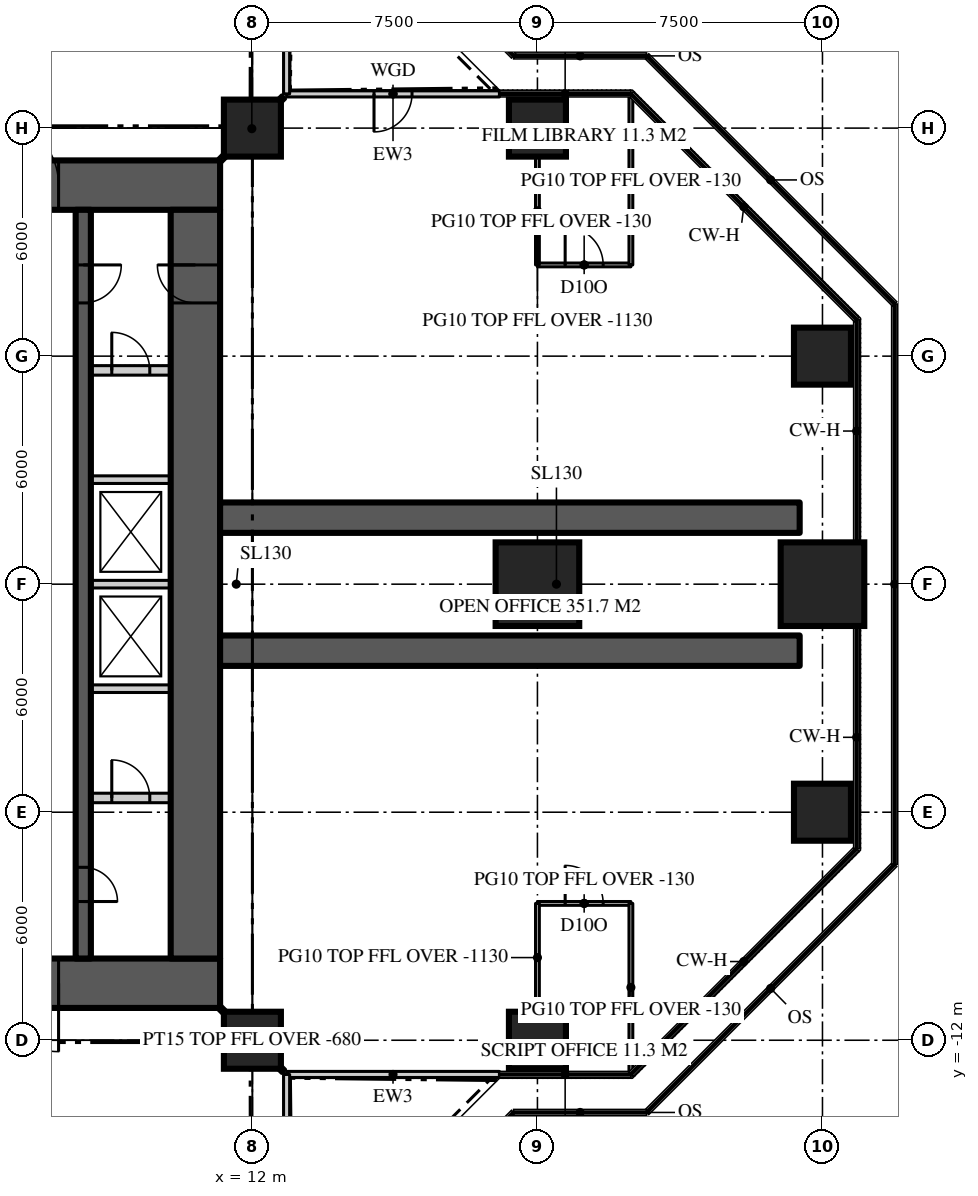
"""IFC4 building model, lengths in metres.
Left out: names, types, materials, properties, quantities, classifications, styles, units other than length and angle.
Written with IfcOpenShell. Run it as: python <this file> out.ifc"""

import sys

from ifc_helpers import new_model, si_unit, direction, frame, frame_2d, origin, origin_2d, place, context, subcontext, project, spatial, rectangle, extrude, element, fill, save


model = new_model("IFC4")
c1 = context("Model", 3, precision=1e-05, world=origin(), true_north=direction((0.0, 1.0)))
c2 = subcontext(c1, "Body", "Model", "MODEL_VIEW")
j1 = project(units=[si_unit("LENGTHUNIT", "METRE"), si_unit("PLANEANGLEUNIT", "RADIAN")], contexts=[c1])
p1 = place(None, origin())
s1 = spatial("IfcSite", under=j1, at=p1, CompositionType="ELEMENT")
p2 = place(p1, origin())
s2 = spatial("IfcBuilding", under=s1, at=p2, CompositionType="ELEMENT")
p3 = place(p2, frame((0.0, 0.0, 255.6)))
s3 = spatial("IfcBuildingStorey", under=s2, at=p3, CompositionType="ELEMENT", Elevation=255.6)
p4 = place(p3, frame((-11.15, 10.5, 0.0), z_axis=(0.0, 0.0, 1.0), x_axis=(1.0, 0.0, 0.0)))
e1 = element("IfcWall", 1, at=p4, inside=s3, PredefinedType="SHEAR", context=c2, shape_type="SweptSolid", body=[
    extrude(rectangle(XDim=22.3, YDim=1.3, at=frame_2d((11.15, 0.0))), origin(), (0.0, 0.0, 1.0), 3.9),
])
p5 = place(p4, frame((4.25, 0.0, 0.0)))
e2 = element("IfcOpeningElement", 2, at=p5, cuts=e1, PredefinedType="OPENING", context=c2, shape_type="SweptSolid", body=[
    extrude(rectangle(XDim=1.8, YDim=2.2, at=frame_2d((0.9, 1.1))), frame((0.0, 0.66, 0.0), z_axis=(0.0, -1.0, 0.0), x_axis=(1.0, 0.0, 0.0)), (0.0, 0.0, 1.0), 1.32),
])
p6 = place(p4, frame((16.25, 0.0, 0.0)))
e3 = element("IfcOpeningElement", 3, at=p6, cuts=e1, PredefinedType="OPENING", context=c2, shape_type="SweptSolid", body=[
    extrude(rectangle(XDim=1.8, YDim=2.2, at=frame_2d((0.9, 1.1))), frame((0.0, 0.66, 0.0), z_axis=(0.0, -1.0, 0.0), x_axis=(1.0, 0.0, 0.0)), (0.0, 0.0, 1.0), 1.32),
])
p7 = place(p3, frame((11.15, -10.5, 0.0), z_axis=(0.0, 0.0, 1.0), x_axis=(-1.0, 0.0, 0.0)))
e4 = element("IfcWall", 4, at=p7, inside=s3, PredefinedType="SHEAR", context=c2, shape_type="SweptSolid", body=[
    extrude(rectangle(XDim=22.3, YDim=1.3, at=frame_2d((11.15, 0.0))), origin(), (0.0, 0.0, 1.0), 3.9),
])
p8 = place(p7, frame((16.25, 0.0, 0.0)))
e5 = element("IfcOpeningElement", 5, at=p8, cuts=e4, PredefinedType="OPENING", context=c2, shape_type="SweptSolid", body=[
    extrude(rectangle(XDim=1.8, YDim=2.2, at=frame_2d((0.9, 1.1))), frame((0.0, 0.66, 0.0), z_axis=(0.0, -1.0, 0.0), x_axis=(1.0, 0.0, 0.0)), (0.0, 0.0, 1.0), 1.32),
])
p9 = place(p7, frame((4.25, 0.0, 0.0)))
e6 = element("IfcOpeningElement", 6, at=p9, cuts=e4, PredefinedType="OPENING", context=c2, shape_type="SweptSolid", body=[
    extrude(rectangle(XDim=1.8, YDim=2.2, at=frame_2d((0.9, 1.1))), frame((0.0, 0.66, 0.0), z_axis=(0.0, -1.0, 0.0), x_axis=(1.0, 0.0, 0.0)), (0.0, 0.0, 1.0), 1.32),
])
p10 = place(p3, frame((10.5, -9.85, 0.0), z_axis=(0.0, 0.0, 1.0), x_axis=(0.0, 1.0, 0.0)))
e7 = element("IfcWall", 7, at=p10, inside=s3, PredefinedType="SHEAR", context=c2, shape_type="SweptSolid", body=[
    extrude(rectangle(XDim=19.7, YDim=1.3, at=frame_2d((9.85, 0.0))), origin(), (0.0, 0.0, 1.0), 3.9),
])
p11 = place(p10, frame((17.25, 0.0, 0.0)))
e8 = element("IfcOpeningElement", 8, at=p11, cuts=e7, PredefinedType="OPENING", context=c2, shape_type="SweptSolid", body=[
    extrude(rectangle(XDim=1.0, YDim=2.2, at=frame_2d((0.5, 1.1))), frame((0.0, 0.66, 0.0), z_axis=(0.0, -1.0, 0.0), x_axis=(1.0, 0.0, 0.0)), (0.0, 0.0, 1.0), 1.32),
])
for number, where, z_axis, x_axis in (
    (9, (11.15, -1.75, 0.0), (0.0, 0.0, 1.0), (1.0, 0.0, 0.0)),
    (10, (11.15, 1.75, 0.0), (0.0, 0.0, 1.0), (1.0, 0.0, 0.0)),
):
    element("IfcWall", number, at=place(p3, frame(where, z_axis=z_axis, x_axis=x_axis)), inside=s3, PredefinedType="SHEAR", context=c2, shape_type="SweptSolid", body=[
        extrude(rectangle(XDim=15.25, YDim=0.8, at=frame_2d((7.625, 0.0))), origin(), (0.0, 0.0, 1.0), 3.9),
    ])
for number, where, z_axis, x_axis in (
    (11, (12.0, -12.0, 0.0), (0.0, 0.0, 1.0), (1.0, 0.0, 0.0)),
    (12, (19.5, -12.0, 0.0), (0.0, 0.0, 1.0), (1.0, 0.0, 0.0)),
    (13, (27.0, -6.0, 0.0), (0.0, 0.0, 1.0), (1.0, 0.0, 0.0)),
):
    element("IfcColumn", number, at=place(p3, frame(where, z_axis=z_axis, x_axis=x_axis)), inside=s3, PredefinedType="COLUMN", context=c2, shape_type="SweptSolid", body=[
        extrude(rectangle(XDim=1.5, YDim=1.5, at=origin_2d()), origin(), (0.0, 0.0, 1.0), 3.9),
    ])
for number, where, z_axis, x_axis in (
    (14, (19.5, 0.0, 0.0), (0.0, 0.0, 1.0), (1.0, 0.0, 0.0)),
    (15, (27.0, 0.0, 0.0), (0.0, 0.0, 1.0), (1.0, 0.0, 0.0)),
):
    element("IfcColumn", number, at=place(p3, frame(where, z_axis=z_axis, x_axis=x_axis)), inside=s3, PredefinedType="COLUMN", context=c2, shape_type="SweptSolid", body=[
        extrude(rectangle(XDim=2.2, YDim=2.2, at=origin_2d()), origin(), (0.0, 0.0, 1.0), 3.9),
    ])
for number, where, z_axis, x_axis in (
    (16, (27.0, 6.0, 0.0), (0.0, 0.0, 1.0), (1.0, 0.0, 0.0)),
    (17, (12.0, 12.0, 0.0), (0.0, 0.0, 1.0), (1.0, 0.0, 0.0)),
    (18, (19.5, 12.0, 0.0), (0.0, 0.0, 1.0), (1.0, 0.0, 0.0)),
):
    element("IfcColumn", number, at=place(p3, frame(where, z_axis=z_axis, x_axis=x_axis)), inside=s3, PredefinedType="COLUMN", context=c2, shape_type="SweptSolid", body=[
        extrude(rectangle(XDim=1.5, YDim=1.5, at=origin_2d()), origin(), (0.0, 0.0, 1.0), 3.9),
    ])
p12 = place(p3, frame((12.9, -12.9, 0.0), z_axis=(0.0, 0.0, 1.0), x_axis=(1.0, 0.0, 0.0)))
e19 = element("IfcWall", 19, at=p12, inside=s3, PredefinedType="SOLIDWALL", context=c2, shape_type="SweptSolid", body=[
    extrude(rectangle(XDim=5.6, YDim=0.16, at=frame_2d((2.8, 0.0))), origin(), (0.0, 0.0, 1.0), 3.77),
])
p13 = place(p3, frame((18.5, 12.9, 0.0), z_axis=(0.0, 0.0, 1.0), x_axis=(-1.0, 0.0, 0.0)))
e20 = element("IfcWall", 20, at=p13, inside=s3, PredefinedType="SOLIDWALL", context=c2, shape_type="SweptSolid", body=[
    extrude(rectangle(XDim=5.6, YDim=0.16, at=frame_2d((2.8, 0.0))), origin(), (0.0, 0.0, 1.0), 3.77),
])
p14 = place(p13, frame((2.3, 0.0, 0.0)))
e21 = element("IfcOpeningElement", 21, at=p14, cuts=e20, PredefinedType="OPENING", context=c2, shape_type="SweptSolid", body=[
    extrude(rectangle(XDim=1.0, YDim=2.2, at=frame_2d((0.5, 1.1))), frame((0.0, 0.09, 0.0), z_axis=(0.0, -1.0, 0.0), x_axis=(1.0, 0.0, 0.0)), (0.0, 0.0, 1.0), 0.18),
])
p15 = place(p3, frame((12.9, 12.9, 0.0), z_axis=(0.0, 0.0, 1.0), x_axis=(0.0, 1.0, 0.0)))
e22 = element("IfcWall", 22, at=p15, inside=s3, PredefinedType="SOLIDWALL", context=c2, shape_type="SweptSolid", body=[
    extrude(rectangle(XDim=5.6, YDim=0.16, at=frame_2d((2.8, 0.0))), origin(), (0.0, 0.0, 1.0), 3.77),
])
p16 = place(p3, frame((12.9, -18.5, 0.0), z_axis=(0.0, 0.0, 1.0), x_axis=(0.0, 1.0, 0.0)))
e23 = element("IfcWall", 23, at=p16, inside=s3, PredefinedType="SOLIDWALL", context=c2, shape_type="SweptSolid", body=[
    extrude(rectangle(XDim=5.6, YDim=0.16, at=frame_2d((2.8, 0.0))), origin(), (0.0, 0.0, 1.0), 3.77),
])
p17 = place(p16, frame((2.3, 0.0, 0.0)))
e24 = element("IfcOpeningElement", 24, at=p17, cuts=e23, PredefinedType="OPENING", context=c2, shape_type="SweptSolid", body=[
    extrude(rectangle(XDim=1.0, YDim=2.2, at=frame_2d((0.5, 1.1))), frame((0.0, 0.09, 0.0), z_axis=(0.0, -1.0, 0.0), x_axis=(1.0, 0.0, 0.0)), (0.0, 0.0, 1.0), 0.18),
])
p18 = place(p3, frame((7.55, 9.85, 0.0), z_axis=(0.0, 0.0, 1.0), x_axis=(0.0, -1.0, 0.0)))
e25 = element("IfcWall", 25, at=p18, inside=s3, PredefinedType="SHEAR", context=c2, shape_type="SweptSolid", body=[
    extrude(rectangle(XDim=19.7, YDim=0.4, at=frame_2d((9.85, 0.0))), origin(), (0.0, 0.0, 1.0), 3.9),
])
p19 = place(p18, frame((1.45, 0.0, 0.0)))
e26 = element("IfcOpeningElement", 26, at=p19, cuts=e25, PredefinedType="OPENING", context=c2, shape_type="SweptSolid", body=[
    extrude(rectangle(XDim=1.0, YDim=2.2, at=frame_2d((0.5, 1.1))), frame((0.0, 0.21, 0.0), z_axis=(0.0, -1.0, 0.0), x_axis=(1.0, 0.0, 0.0)), (0.0, 0.0, 1.0), 0.42),
])
p20 = place(p18, frame((17.3, 0.0, 0.0)))
e27 = element("IfcOpeningElement", 27, at=p20, cuts=e25, PredefinedType="OPENING", context=c2, shape_type="SweptSolid", body=[
    extrude(rectangle(XDim=0.9, YDim=2.1, at=frame_2d((0.45, 1.05))), frame((0.0, 0.21, 0.0), z_axis=(0.0, -1.0, 0.0), x_axis=(1.0, 0.0, 0.0)), (0.0, 0.0, 1.0), 0.42),
])
p21 = place(p3, frame((7.75, 5.625, 0.0), z_axis=(0.0, 0.0, 1.0), x_axis=(1.0, 0.0, 0.0)))
e28 = element("IfcWall", 28, at=p21, inside=s3, PredefinedType="SOLIDWALL", context=c2, shape_type="SweptSolid", body=[
    extrude(rectangle(XDim=2.1, YDim=0.25, at=frame_2d((1.05, 0.0))), origin(), (0.0, 0.0, 1.0), 3.7),
])
p22 = place(p21, frame((0.55, 0.0, 0.0)))
e29 = element("IfcOpeningElement", 29, at=p22, cuts=e28, PredefinedType="OPENING", context=c2, shape_type="SweptSolid", body=[
    extrude(rectangle(XDim=1.0, YDim=2.2, at=frame_2d((0.5, 1.1))), frame((0.0, 0.135, 0.0), z_axis=(0.0, -1.0, 0.0), x_axis=(1.0, 0.0, 0.0)), (0.0, 0.0, 1.0), 0.27),
])
p23 = place(p3, frame((7.75, -5.625, 0.0), z_axis=(0.0, 0.0, 1.0), x_axis=(1.0, 0.0, 0.0)))
e30 = element("IfcWall", 30, at=p23, inside=s3, PredefinedType="SOLIDWALL", context=c2, shape_type="SweptSolid", body=[
    extrude(rectangle(XDim=2.1, YDim=0.25, at=frame_2d((1.05, 0.0))), origin(), (0.0, 0.0, 1.0), 3.7),
])
p24 = place(p23, frame((0.55, 0.0, 0.0)))
e31 = element("IfcOpeningElement", 31, at=p24, cuts=e30, PredefinedType="OPENING", context=c2, shape_type="SweptSolid", body=[
    extrude(rectangle(XDim=1.0, YDim=2.2, at=frame_2d((0.5, 1.1))), frame((0.0, 0.135, 0.0), z_axis=(0.0, -1.0, 0.0), x_axis=(1.0, 0.0, 0.0)), (0.0, 0.0, 1.0), 0.27),
])
for number, where, z_axis, x_axis in (
    (32, (7.75, -2.75, 0.0), (0.0, 0.0, 1.0), (1.0, 0.0, 0.0)),
    (33, (7.75, 0.0, 0.0), (0.0, 0.0, 1.0), (1.0, 0.0, 0.0)),
    (34, (7.75, 2.75, 0.0), (0.0, 0.0, 1.0), (1.0, 0.0, 0.0)),
):
    element("IfcWall", number, at=place(p3, frame(where, z_axis=z_axis, x_axis=x_axis)), inside=s3, PredefinedType="SOLIDWALL", context=c2, shape_type="SweptSolid", body=[
        extrude(rectangle(XDim=2.1, YDim=0.2, at=frame_2d((1.05, 0.0))), origin(), (0.0, 0.0, 1.0), 3.7),
    ])
p25 = place(p3, frame((19.5, 8.4, 0.0), z_axis=(0.0, 0.0, 1.0), x_axis=(1.0, 0.0, 0.0)))
e35 = element("IfcWall", 35, at=p25, inside=s3, PredefinedType="PARTITIONING", context=c2, shape_type="SweptSolid", body=[
    extrude(rectangle(XDim=2.459, YDim=0.1, at=frame_2d((1.229, 0.0))), origin(), (0.0, 0.0, 1.0), 3.77),
])
p26 = place(p25, frame((0.729, 0.0, 0.0)))
e36 = element("IfcOpeningElement", 36, at=p26, cuts=e35, PredefinedType="OPENING", context=c2, shape_type="SweptSolid", body=[
    extrude(rectangle(XDim=1.0, YDim=2.2, at=frame_2d((0.5, 1.1))), frame((0.0, 0.06, 0.0), z_axis=(0.0, -1.0, 0.0), x_axis=(1.0, 0.0, 0.0)), (0.0, 0.0, 1.0), 0.12),
])
p27 = place(p3, frame((19.5, 8.4, 0.0), z_axis=(0.0, 0.0, 1.0), x_axis=(0.0, 1.0, 0.0)))
e37 = element("IfcWall", 37, at=p27, inside=s3, PredefinedType="PARTITIONING", context=c2, shape_type="SweptSolid", body=[
    extrude(rectangle(XDim=2.85, YDim=0.1, at=frame_2d((1.425, 0.0))), origin(), (0.0, 0.0, 1.0), 2.77),
])
p28 = place(p3, frame((21.959, 8.4, 0.0), z_axis=(0.0, 0.0, 1.0), x_axis=(0.0, 1.0, 0.0)))
e38 = element("IfcWall", 38, at=p28, inside=s3, PredefinedType="PARTITIONING", context=c2, shape_type="SweptSolid", body=[
    extrude(rectangle(XDim=4.42, YDim=0.1, at=frame_2d((2.21, 0.0))), origin(), (0.0, 0.0, 1.0), 3.77),
])
p29 = place(p3, frame((19.5, -8.4, 0.0), z_axis=(0.0, 0.0, 1.0), x_axis=(1.0, 0.0, 0.0)))
e39 = element("IfcWall", 39, at=p29, inside=s3, PredefinedType="PARTITIONING", context=c2, shape_type="SweptSolid", body=[
    extrude(rectangle(XDim=2.459, YDim=0.1, at=frame_2d((1.229, 0.0))), origin(), (0.0, 0.0, 1.0), 3.77),
])
p30 = place(p29, frame((0.729, 0.0, 0.0)))
e40 = element("IfcOpeningElement", 40, at=p30, cuts=e39, PredefinedType="OPENING", context=c2, shape_type="SweptSolid", body=[
    extrude(rectangle(XDim=1.0, YDim=2.2, at=frame_2d((0.5, 1.1))), frame((0.0, 0.06, 0.0), z_axis=(0.0, -1.0, 0.0), x_axis=(1.0, 0.0, 0.0)), (0.0, 0.0, 1.0), 0.12),
])
p31 = place(p3, frame((19.5, -8.4, 0.0), z_axis=(0.0, 0.0, 1.0), x_axis=(0.0, -1.0, 0.0)))
e41 = element("IfcWall", 41, at=p31, inside=s3, PredefinedType="PARTITIONING", context=c2, shape_type="SweptSolid", body=[
    extrude(rectangle(XDim=2.85, YDim=0.1, at=frame_2d((1.425, 0.0))), origin(), (0.0, 0.0, 1.0), 2.77),
])
p32 = place(p3, frame((21.959, -8.4, 0.0), z_axis=(0.0, 0.0, 1.0), x_axis=(0.0, -1.0, 0.0)))
e42 = element("IfcWall", 42, at=p32, inside=s3, PredefinedType="PARTITIONING", context=c2, shape_type="SweptSolid", body=[
    extrude(rectangle(XDim=4.42, YDim=0.1, at=frame_2d((2.21, 0.0))), origin(), (0.0, 0.0, 1.0), 3.77),
])
for number, where, z_axis, x_axis in (
    (43, (11.15, 11.15, 0.0), (0.0, 0.0, 1.0), (0.707, 0.707, 0.0)),
    (44, (11.15, -11.15, 0.0), (0.0, 0.0, 1.0), (0.707, -0.707, 0.0)),
):
    element("IfcWall", number, at=place(p3, frame(where, z_axis=z_axis, x_axis=x_axis)), inside=s3, PredefinedType="PARTITIONING", context=c2, shape_type="SweptSolid", body=[
        extrude(rectangle(XDim=2.362, YDim=0.15, at=frame_2d((1.181, 0.0))), origin(), (0.0, 0.0, 1.0), 3.22),
    ])
p33 = place(p14, origin())
e45 = element("IfcDoor", 45, at=p33, inside=s3, OperationType="SINGLE_SWING_RIGHT", PredefinedType="DOOR", context=c2, shape_type="SweptSolid", body=[
    extrude(rectangle(XDim=1.0, YDim=2.2, at=frame_2d((0.5, 1.1))), frame((0.0, 0.025, 0.0), z_axis=(0.0, -1.0, 0.0), x_axis=(1.0, 0.0, 0.0)), (0.0, 0.0, 1.0), 0.05),
])
fill(e21, e45)
p34 = place(p6, origin())
e46 = element("IfcDoor", 46, at=p34, inside=s3, OperationType="DOUBLE_DOOR_DOUBLE_SWING", PredefinedType="DOOR", context=c2, shape_type="SweptSolid", body=[
    extrude(rectangle(XDim=1.8, YDim=2.2, at=frame_2d((0.9, 1.1))), frame((0.0, 0.025, 0.0), z_axis=(0.0, -1.0, 0.0), x_axis=(1.0, 0.0, 0.0)), (0.0, 0.0, 1.0), 0.05),
])
fill(e3, e46)
p35 = place(p9, origin())
e47 = element("IfcDoor", 47, at=p35, inside=s3, OperationType="DOUBLE_DOOR_DOUBLE_SWING", PredefinedType="DOOR", context=c2, shape_type="SweptSolid", body=[
    extrude(rectangle(XDim=1.8, YDim=2.2, at=frame_2d((0.9, 1.1))), frame((0.0, 0.025, 0.0), z_axis=(0.0, -1.0, 0.0), x_axis=(1.0, 0.0, 0.0)), (0.0, 0.0, 1.0), 0.05),
])
fill(e6, e47)
p36 = place(p19, origin())
e48 = element("IfcDoor", 48, at=p36, inside=s3, OperationType="SINGLE_SWING_LEFT", PredefinedType="DOOR", context=c2, shape_type="SweptSolid", body=[
    extrude(rectangle(XDim=1.0, YDim=2.2, at=frame_2d((0.5, 1.1))), frame((0.0, 0.025, 0.0), z_axis=(0.0, -1.0, 0.0), x_axis=(1.0, 0.0, 0.0)), (0.0, 0.0, 1.0), 0.05),
])
fill(e26, e48)
p37 = place(p11, origin())
e49 = element("IfcDoor", 49, at=p37, inside=s3, OperationType="SINGLE_SWING_RIGHT", PredefinedType="DOOR", context=c2, shape_type="SweptSolid", body=[
    extrude(rectangle(XDim=1.0, YDim=2.2, at=frame_2d((0.5, 1.1))), frame((0.0, 0.025, 0.0), z_axis=(0.0, -1.0, 0.0), x_axis=(1.0, 0.0, 0.0)), (0.0, 0.0, 1.0), 0.05),
])
fill(e8, e49)
p38 = place(p20, origin())
e50 = element("IfcDoor", 50, at=p38, inside=s3, OperationType="SINGLE_SWING_RIGHT", PredefinedType="DOOR", context=c2, shape_type="SweptSolid", body=[
    extrude(rectangle(XDim=0.9, YDim=2.1, at=frame_2d((0.45, 1.05))), frame((0.0, 0.025, 0.0), z_axis=(0.0, -1.0, 0.0), x_axis=(1.0, 0.0, 0.0)), (0.0, 0.0, 1.0), 0.05),
])
fill(e27, e50)
p39 = place(p26, origin())
e51 = element("IfcDoor", 51, at=p39, inside=s3, OperationType="SINGLE_SWING_LEFT", PredefinedType="DOOR", context=c2, shape_type="SweptSolid", body=[
    extrude(rectangle(XDim=1.0, YDim=2.2, at=frame_2d((0.5, 1.1))), frame((0.0, 0.025, 0.0), z_axis=(0.0, -1.0, 0.0), x_axis=(1.0, 0.0, 0.0)), (0.0, 0.0, 1.0), 0.05),
])
fill(e36, e51)
p40 = place(p30, origin())
e52 = element("IfcDoor", 52, at=p40, inside=s3, OperationType="SINGLE_SWING_LEFT", PredefinedType="DOOR", context=c2, shape_type="SweptSolid", body=[
    extrude(rectangle(XDim=1.0, YDim=2.2, at=frame_2d((0.5, 1.1))), frame((0.0, 0.025, 0.0), z_axis=(0.0, -1.0, 0.0), x_axis=(1.0, 0.0, 0.0)), (0.0, 0.0, 1.0), 0.05),
])
fill(e40, e52)
p41 = place(p22, origin())
e53 = element("IfcDoor", 53, at=p41, inside=s3, OperationType="SINGLE_SWING_LEFT", PredefinedType="DOOR", context=c2, shape_type="SweptSolid", body=[
    extrude(rectangle(XDim=1.0, YDim=2.2, at=frame_2d((0.5, 1.1))), frame((0.0, 0.025, 0.0), z_axis=(0.0, -1.0, 0.0), x_axis=(1.0, 0.0, 0.0)), (0.0, 0.0, 1.0), 0.05),
])
fill(e29, e53)
p42 = place(p24, origin())
e54 = element("IfcDoor", 54, at=p42, inside=s3, OperationType="SINGLE_SWING_LEFT", PredefinedType="DOOR", context=c2, shape_type="SweptSolid", body=[
    extrude(rectangle(XDim=1.0, YDim=2.2, at=frame_2d((0.5, 1.1))), frame((0.0, 0.025, 0.0), z_axis=(0.0, -1.0, 0.0), x_axis=(1.0, 0.0, 0.0)), (0.0, 0.0, 1.0), 0.05),
])
fill(e31, e54)
save(model, sys.argv[1])
